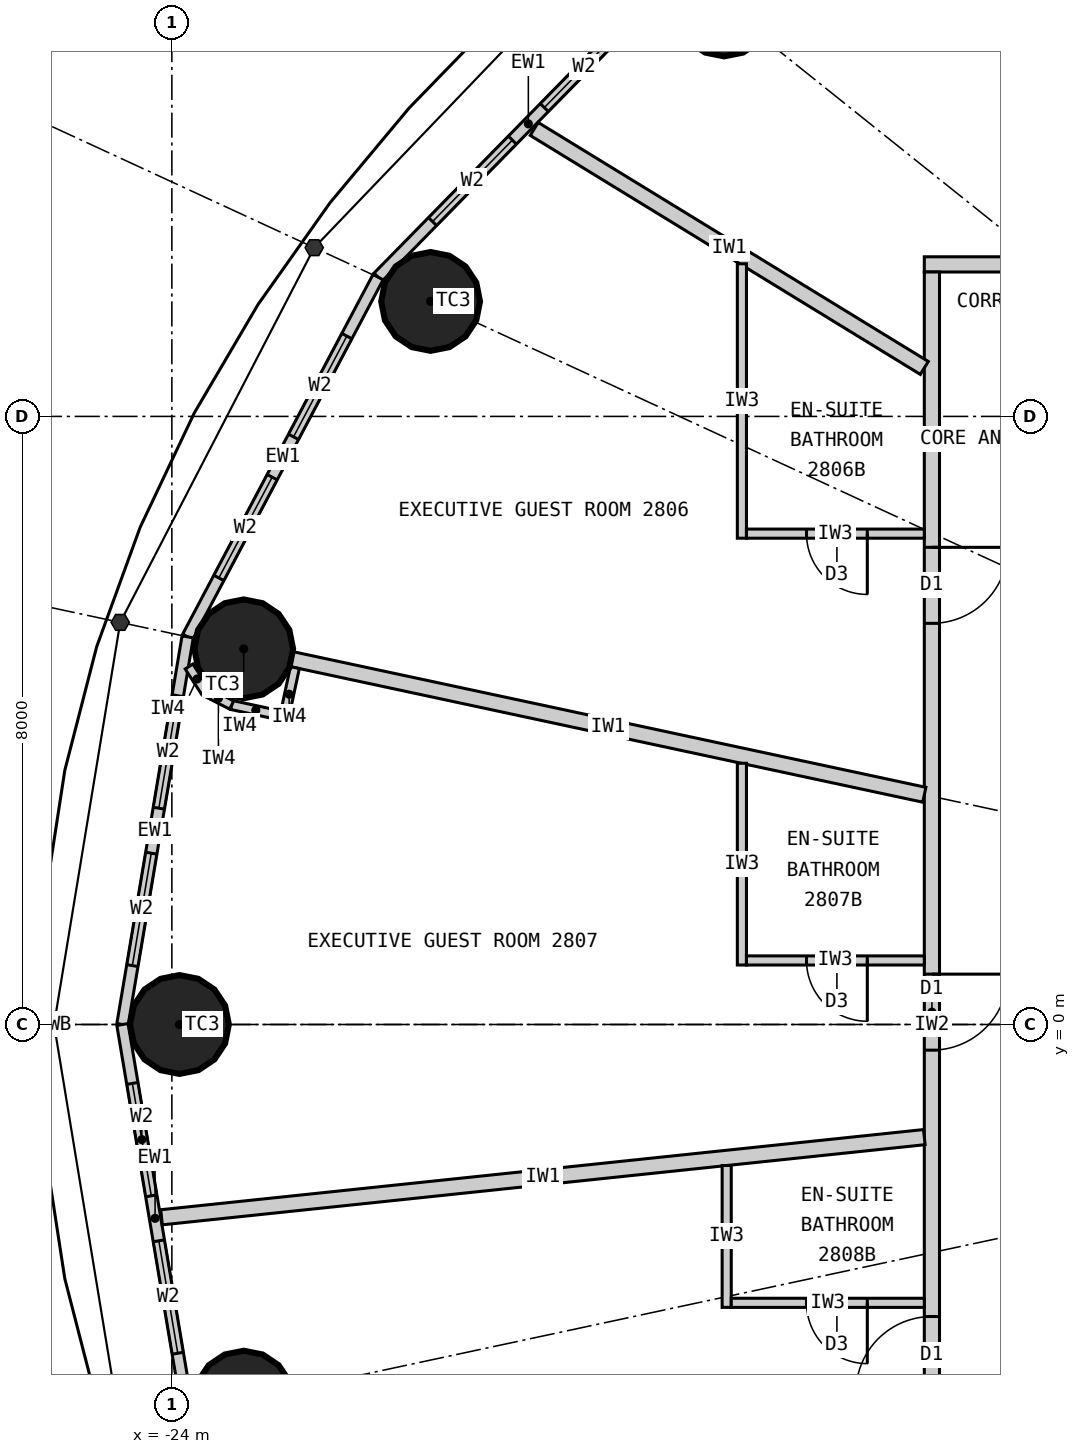
"""IFC4 building model, lengths in metres.
Left out: names, types, materials, properties, quantities, classifications, styles, units other than length and angle.
Written with IfcOpenShell. Run it as: python <this file> out.ifc"""

import sys

from ifc_helpers import new_model, si_unit, direction, frame, frame_2d, origin, origin_2d, place, context, subcontext, project, spatial, rectangle, circle, extrude, element, fill, save


model = new_model("IFC4")
c1 = context("Model", 3, precision=1e-05, world=origin(), true_north=direction((0.0, 1.0)))
c2 = subcontext(c1, "Body", "Model", "MODEL_VIEW")
j1 = project(units=[si_unit("LENGTHUNIT", "METRE"), si_unit("PLANEANGLEUNIT", "RADIAN")], contexts=[c1])
p1 = place(None, origin())
s1 = spatial("IfcSite", under=j1, at=p1, CompositionType="ELEMENT")
p2 = place(p1, origin())
s2 = spatial("IfcBuilding", under=s1, at=p2, CompositionType="ELEMENT")
p3 = place(p2, frame((0.0, 0.0, 112.2)))
s3 = spatial("IfcBuildingStorey", under=s2, at=p3, CompositionType="ELEMENT", Elevation=112.2)
for number, where, z_axis, x_axis in (
    (1, (-16.734, 13.387, 0.0), (0.0, 0.0, 1.0), (1.0, 0.0, 0.0)),
    (2, (-20.596, 9.513, 0.0), (0.0, 0.0, 1.0), (1.0, 0.0, 0.0)),
    (3, (-23.055, 4.942, 0.0), (0.0, 0.0, 1.0), (1.0, 0.0, 0.0)),
    (4, (-23.9, 0.0, 0.0), (0.0, 0.0, 1.0), (1.0, 0.0, 0.0)),
    (5, (-23.055, -4.942, 0.0), (0.0, 0.0, 1.0), (1.0, 0.0, 0.0)),
):
    element("IfcColumn", number, at=place(p3, frame(where, z_axis=z_axis, x_axis=x_axis)), inside=s3, PredefinedType="COLUMN", context=c2, shape_type="SweptSolid", body=[
        extrude(circle(Radius=0.65, at=origin_2d()), origin(), (0.0, 0.0, 1.0), 3.3),
    ])
p4 = place(p3, frame((-17.332, 13.866, 0.0), z_axis=(0.0, 0.0, 1.0), x_axis=(-0.700136650834, -0.714008872605, 0.0)))
e6 = element("IfcWall", 6, at=p4, inside=s3, PredefinedType="ELEMENTEDWALL", context=c2, shape_type="SweptSolid", body=[
    extrude(rectangle(XDim=5.649, YDim=0.15, at=frame_2d((2.825, 0.0))), origin(), (0.0, 0.0, 1.0), 3.12),
])
p5 = place(p4, frame((1.025, 0.0, 0.9)))
e7 = element("IfcOpeningElement", 7, at=p5, cuts=e6, PredefinedType="OPENING", context=c2, shape_type="SweptSolid", body=[
    extrude(rectangle(XDim=1.5, YDim=1.9, at=frame_2d((0.75, 0.95))), frame((0.0, 0.085, 0.0), z_axis=(0.0, -1.0, 0.0), x_axis=(1.0, 0.0, 0.0)), (0.0, 0.0, 1.0), 0.17),
])
p6 = place(p4, frame((3.125, 0.0, 0.9)))
e8 = element("IfcOpeningElement", 8, at=p6, cuts=e6, PredefinedType="OPENING", context=c2, shape_type="SweptSolid", body=[
    extrude(rectangle(XDim=1.5, YDim=1.9, at=frame_2d((0.75, 0.95))), frame((0.0, 0.085, 0.0), z_axis=(0.0, -1.0, 0.0), x_axis=(1.0, 0.0, 0.0)), (0.0, 0.0, 1.0), 0.17),
])
p7 = place(p3, frame((-21.287, 9.832, 0.0), z_axis=(0.0, 0.0, 1.0), x_axis=(-0.467814388454, -0.883826735257, 0.0)))
e9 = element("IfcWall", 9, at=p7, inside=s3, PredefinedType="ELEMENTEDWALL", context=c2, shape_type="SweptSolid", body=[
    extrude(rectangle(XDim=5.354, YDim=0.15, at=frame_2d((2.677, 0.0))), origin(), (0.0, 0.0, 1.0), 3.12),
])
p8 = place(p7, frame((0.877, 0.0, 0.9)))
e10 = element("IfcOpeningElement", 10, at=p8, cuts=e9, PredefinedType="OPENING", context=c2, shape_type="SweptSolid", body=[
    extrude(rectangle(XDim=1.5, YDim=1.9, at=frame_2d((0.75, 0.95))), frame((0.0, 0.085, 0.0), z_axis=(0.0, -1.0, 0.0), x_axis=(1.0, 0.0, 0.0)), (0.0, 0.0, 1.0), 0.17),
])
p9 = place(p7, frame((2.977, 0.0, 0.9)))
e11 = element("IfcOpeningElement", 11, at=p9, cuts=e9, PredefinedType="OPENING", context=c2, shape_type="SweptSolid", body=[
    extrude(rectangle(XDim=1.5, YDim=1.9, at=frame_2d((0.75, 0.95))), frame((0.0, 0.085, 0.0), z_axis=(0.0, -1.0, 0.0), x_axis=(1.0, 0.0, 0.0)), (0.0, 0.0, 1.0), 0.17),
])
p10 = place(p3, frame((-23.792, 5.1, 0.0), z_axis=(0.0, 0.0, 1.0), x_axis=(-0.165883894218, -0.986145290329, 0.0)))
e12 = element("IfcWall", 12, at=p10, inside=s3, PredefinedType="ELEMENTEDWALL", context=c2, shape_type="SweptSolid", body=[
    extrude(rectangle(XDim=5.172, YDim=0.15, at=frame_2d((2.586, 0.0))), origin(), (0.0, 0.0, 1.0), 3.12),
])
p11 = place(p10, frame((0.786, 0.0, 0.9)))
e13 = element("IfcOpeningElement", 13, at=p11, cuts=e12, PredefinedType="OPENING", context=c2, shape_type="SweptSolid", body=[
    extrude(rectangle(XDim=1.5, YDim=1.9, at=frame_2d((0.75, 0.95))), frame((0.0, 0.085, 0.0), z_axis=(0.0, -1.0, 0.0), x_axis=(1.0, 0.0, 0.0)), (0.0, 0.0, 1.0), 0.17),
])
p12 = place(p10, frame((2.886, 0.0, 0.9)))
e14 = element("IfcOpeningElement", 14, at=p12, cuts=e12, PredefinedType="OPENING", context=c2, shape_type="SweptSolid", body=[
    extrude(rectangle(XDim=1.5, YDim=1.9, at=frame_2d((0.75, 0.95))), frame((0.0, 0.085, 0.0), z_axis=(0.0, -1.0, 0.0), x_axis=(1.0, 0.0, 0.0)), (0.0, 0.0, 1.0), 0.17),
])
p13 = place(p3, frame((-24.65, 0.0, 0.0), z_axis=(0.0, 0.0, 1.0), x_axis=(0.165883894218, -0.986145290329, 0.0)))
e15 = element("IfcWall", 15, at=p13, inside=s3, PredefinedType="ELEMENTEDWALL", context=c2, shape_type="SweptSolid", body=[
    extrude(rectangle(XDim=5.172, YDim=0.15, at=frame_2d((2.586, 0.0))), origin(), (0.0, 0.0, 1.0), 3.12),
])
p14 = place(p13, frame((0.786, 0.0, 0.9)))
e16 = element("IfcOpeningElement", 16, at=p14, cuts=e15, PredefinedType="OPENING", context=c2, shape_type="SweptSolid", body=[
    extrude(rectangle(XDim=1.5, YDim=1.9, at=frame_2d((0.75, 0.95))), frame((0.0, 0.085, 0.0), z_axis=(0.0, -1.0, 0.0), x_axis=(1.0, 0.0, 0.0)), (0.0, 0.0, 1.0), 0.17),
])
p15 = place(p13, frame((2.886, 0.0, 0.9)))
e17 = element("IfcOpeningElement", 17, at=p15, cuts=e15, PredefinedType="OPENING", context=c2, shape_type="SweptSolid", body=[
    extrude(rectangle(XDim=1.5, YDim=1.9, at=frame_2d((0.75, 0.95))), frame((0.0, 0.085, 0.0), z_axis=(0.0, -1.0, 0.0), x_axis=(1.0, 0.0, 0.0)), (0.0, 0.0, 1.0), 0.17),
])
p16 = place(p3, frame((-14.1, 10.0, 0.0), z_axis=(0.0, 0.0, 1.0), x_axis=(1.0, 0.0, 0.0)))
e18 = element("IfcWall", 18, at=p16, inside=s3, PredefinedType="PARTITIONING", context=c2, shape_type="SweptSolid", body=[
    extrude(rectangle(XDim=12.535, YDim=0.2, at=frame_2d((6.268, 0.0))), origin(), (0.0, 0.0, 1.0), 3.12),
])
p17 = place(p16, frame((2.801, 0.0, 0.0)))
e19 = element("IfcOpeningElement", 19, at=p17, cuts=e18, PredefinedType="OPENING", context=c2, shape_type="SweptSolid", body=[
    extrude(rectangle(XDim=1.0, YDim=2.2, at=frame_2d((0.5, 1.1))), frame((0.0, 0.11, 0.0), z_axis=(0.0, -1.0, 0.0), x_axis=(1.0, 0.0, 0.0)), (0.0, 0.0, 1.0), 0.22),
])
p18 = place(p3, frame((-14.0, 9.9, 0.0), z_axis=(0.0, 0.0, 1.0), x_axis=(0.0, -1.0, 0.0)))
e20 = element("IfcWall", 20, at=p18, inside=s3, PredefinedType="PARTITIONING", context=c2, shape_type="SweptSolid", body=[
    extrude(rectangle(XDim=19.8, YDim=0.2, at=frame_2d((9.9, 0.0))), origin(), (0.0, 0.0, 1.0), 3.12),
])
p19 = place(p18, frame((3.622, 0.0, 0.0)))
e21 = element("IfcOpeningElement", 21, at=p19, cuts=e20, PredefinedType="OPENING", context=c2, shape_type="SweptSolid", body=[
    extrude(rectangle(XDim=1.0, YDim=2.2, at=frame_2d((0.5, 1.1))), frame((0.0, 0.11, 0.0), z_axis=(0.0, -1.0, 0.0), x_axis=(1.0, 0.0, 0.0)), (0.0, 0.0, 1.0), 0.22),
])
p20 = place(p18, frame((9.238, 0.0, 0.0)))
e22 = element("IfcOpeningElement", 22, at=p20, cuts=e20, PredefinedType="OPENING", context=c2, shape_type="SweptSolid", body=[
    extrude(rectangle(XDim=1.0, YDim=2.2, at=frame_2d((0.5, 1.1))), frame((0.0, 0.11, 0.0), z_axis=(0.0, -1.0, 0.0), x_axis=(1.0, 0.0, 0.0)), (0.0, 0.0, 1.0), 0.22),
])
p21 = place(p18, frame((13.742, 0.0, 0.0)))
e23 = element("IfcOpeningElement", 23, at=p21, cuts=e20, PredefinedType="OPENING", context=c2, shape_type="SweptSolid", body=[
    extrude(rectangle(XDim=1.0, YDim=2.2, at=frame_2d((0.5, 1.1))), frame((0.0, 0.11, 0.0), z_axis=(0.0, -1.0, 0.0), x_axis=(1.0, 0.0, 0.0)), (0.0, 0.0, 1.0), 0.22),
])
p22 = place(p18, frame((18.698, 0.0, 0.0)))
e24 = element("IfcOpeningElement", 24, at=p22, cuts=e20, PredefinedType="OPENING", context=c2, shape_type="SweptSolid", body=[
    extrude(rectangle(XDim=1.0, YDim=2.2, at=frame_2d((0.5, 1.1))), frame((0.0, 0.11, 0.0), z_axis=(0.0, -1.0, 0.0), x_axis=(1.0, 0.0, 0.0)), (0.0, 0.0, 1.0), 0.22),
])
p23 = place(p3, frame((-14.1, 8.638, 0.0), z_axis=(0.0, 0.0, 1.0), x_axis=(-0.852706758009, 0.5223898782, 0.0)))
e25 = element("IfcWall", 25, at=p23, inside=s3, PredefinedType="PARTITIONING", context=c2, shape_type="SweptSolid", body=[
    extrude(rectangle(XDim=6.019, YDim=0.2, at=frame_2d((3.009, 0.0))), origin(), (0.0, 0.0, 1.0), 3.12),
])
p24 = place(p3, frame((-14.1, 3.022, 0.0), z_axis=(0.0, 0.0, 1.0), x_axis=(-0.977783513367, 0.209617272638, 0.0)))
e26 = element("IfcWall", 26, at=p24, inside=s3, PredefinedType="PARTITIONING", context=c2, shape_type="SweptSolid", body=[
    extrude(rectangle(XDim=8.508, YDim=0.2, at=frame_2d((4.254, 0.0))), origin(), (0.0, 0.0, 1.0), 2.37),
])
p25 = place(p3, frame((-14.1, -1.482, 0.0), z_axis=(0.0, 0.0, 1.0), x_axis=(-0.994523202615, -0.104516024894, 0.0)))
e27 = element("IfcWall", 27, at=p25, inside=s3, PredefinedType="PARTITIONING", context=c2, shape_type="SweptSolid", body=[
    extrude(rectangle(XDim=10.091, YDim=0.2, at=frame_2d((5.045, 0.0))), origin(), (0.0, 0.0, 1.0), 2.47),
])
p26 = place(p3, frame((-16.5, 10.008, 0.0), z_axis=(0.0, 0.0, 1.0), x_axis=(0.0, -1.0, 0.0)))
e28 = element("IfcWall", 28, at=p26, inside=s3, PredefinedType="PARTITIONING", context=c2, shape_type="SweptSolid", body=[
    extrude(rectangle(XDim=3.61, YDim=0.12, at=frame_2d((1.805, 0.0))), origin(), (0.0, 0.0, 1.0), 3.12),
])
p27 = place(p3, frame((-14.1, 6.458, 0.0), z_axis=(0.0, 0.0, 1.0), x_axis=(-1.0, 0.0, 0.0)))
e29 = element("IfcWall", 29, at=p27, inside=s3, PredefinedType="PARTITIONING", context=c2, shape_type="SweptSolid", body=[
    extrude(rectangle(XDim=2.34, YDim=0.12, at=frame_2d((1.17, 0.0))), origin(), (0.0, 0.0, 1.0), 3.12),
])
p28 = place(p27, frame((0.75, 0.0, 0.0)))
e30 = element("IfcOpeningElement", 30, at=p28, cuts=e29, PredefinedType="OPENING", context=c2, shape_type="SweptSolid", body=[
    extrude(rectangle(XDim=0.8, YDim=2.1, at=frame_2d((0.4, 1.05))), frame((0.0, 0.07, 0.0), z_axis=(0.0, -1.0, 0.0), x_axis=(1.0, 0.0, 0.0)), (0.0, 0.0, 1.0), 0.14),
])
p29 = place(p3, frame((-16.5, 3.437, 0.0), z_axis=(0.0, 0.0, 1.0), x_axis=(0.0, -1.0, 0.0)))
e31 = element("IfcWall", 31, at=p29, inside=s3, PredefinedType="PARTITIONING", context=c2, shape_type="SweptSolid", body=[
    extrude(rectangle(XDim=2.655, YDim=0.12, at=frame_2d((1.327, 0.0))), origin(), (0.0, 0.0, 1.0), 3.12),
])
p30 = place(p3, frame((-14.1, 0.843, 0.0), z_axis=(0.0, 0.0, 1.0), x_axis=(-1.0, 0.0, 0.0)))
e32 = element("IfcWall", 32, at=p30, inside=s3, PredefinedType="PARTITIONING", context=c2, shape_type="SweptSolid", body=[
    extrude(rectangle(XDim=2.34, YDim=0.12, at=frame_2d((1.17, 0.0))), origin(), (0.0, 0.0, 1.0), 3.12),
])
p31 = place(p30, frame((0.75, 0.0, 0.0)))
e33 = element("IfcOpeningElement", 33, at=p31, cuts=e32, PredefinedType="OPENING", context=c2, shape_type="SweptSolid", body=[
    extrude(rectangle(XDim=0.8, YDim=2.1, at=frame_2d((0.4, 1.05))), frame((0.0, 0.07, 0.0), z_axis=(0.0, -1.0, 0.0), x_axis=(1.0, 0.0, 0.0)), (0.0, 0.0, 1.0), 0.14),
])
p32 = place(p3, frame((-16.7, -1.855, 0.0), z_axis=(0.0, 0.0, 1.0), x_axis=(0.0, -1.0, 0.0)))
e34 = element("IfcWall", 34, at=p32, inside=s3, PredefinedType="PARTITIONING", context=c2, shape_type="SweptSolid", body=[
    extrude(rectangle(XDim=1.867, YDim=0.12, at=frame_2d((0.933, 0.0))), origin(), (0.0, 0.0, 1.0), 3.12),
])
p33 = place(p3, frame((-14.1, -3.662, 0.0), z_axis=(0.0, 0.0, 1.0), x_axis=(-1.0, 0.0, 0.0)))
e35 = element("IfcWall", 35, at=p33, inside=s3, PredefinedType="PARTITIONING", context=c2, shape_type="SweptSolid", body=[
    extrude(rectangle(XDim=2.54, YDim=0.12, at=frame_2d((1.27, 0.0))), origin(), (0.0, 0.0, 1.0), 2.37),
])
p34 = place(p33, frame((0.75, 0.0, 0.0)))
e36 = element("IfcOpeningElement", 36, at=p34, cuts=e35, PredefinedType="OPENING", context=c2, shape_type="SweptSolid", body=[
    extrude(rectangle(XDim=0.8, YDim=2.1, at=frame_2d((0.4, 1.05))), frame((0.0, 0.07, 0.0), z_axis=(0.0, -1.0, 0.0), x_axis=(1.0, 0.0, 0.0)), (0.0, 0.0, 1.0), 0.14),
])
p35 = place(p3, frame((-22.382, 4.695, 0.0), z_axis=(0.0, 0.0, 1.0), x_axis=(-0.209808658628, -0.977742464438, 0.0)))
e37 = element("IfcWall", 37, at=p35, inside=s3, PredefinedType="PARTITIONING", context=c2, shape_type="SweptSolid", body=[
    extrude(rectangle(XDim=0.716, YDim=0.12, at=frame_2d((0.358, 0.0))), origin(), (0.0, 0.0, 1.0), 3.12),
])
p36 = place(p3, frame((-22.578, 4.067, 0.0), z_axis=(0.0, 0.0, 1.0), x_axis=(-0.977802414077, 0.209529088731, 0.0)))
e38 = element("IfcWall", 38, at=p36, inside=s3, PredefinedType="PARTITIONING", context=c2, shape_type="SweptSolid", body=[
    extrude(rectangle(XDim=0.65, YDim=0.12, at=frame_2d((0.325, 0.0))), origin(), (0.0, 0.0, 1.0), 3.12),
])
for number, where, z_axis, x_axis in (
    (39, (-23.213, 4.203, 0.0), (0.0, 0.0, 1.0), (-0.89, 0.456, 0.0)),
    (40, (-23.562, 4.381, 0.0), (0.0, 0.0, 1.0), (-0.543, 0.84, 0.0)),
):
    element("IfcWall", number, at=place(p3, frame(where, z_axis=z_axis, x_axis=x_axis)), inside=s3, PredefinedType="PARTITIONING", context=c2, shape_type="SweptSolid", body=[
        extrude(rectangle(XDim=0.391, YDim=0.12, at=frame_2d((0.196, 0.0))), origin(), (0.0, 0.0, 1.0), 3.12),
    ])
p37 = place(p5, origin())
e41 = element("IfcWindow", 41, at=p37, inside=s3, PartitioningType="SINGLE_PANEL", PredefinedType="WINDOW", context=c2, shape_type="SweptSolid", body=[
    extrude(rectangle(XDim=1.5, YDim=1.9, at=frame_2d((0.75, 0.95))), frame((0.0, 0.03, 0.0), z_axis=(0.0, -1.0, 0.0), x_axis=(1.0, 0.0, 0.0)), (0.0, 0.0, 1.0), 0.06),
])
fill(e7, e41)
p38 = place(p6, origin())
e42 = element("IfcWindow", 42, at=p38, inside=s3, PartitioningType="SINGLE_PANEL", PredefinedType="WINDOW", context=c2, shape_type="SweptSolid", body=[
    extrude(rectangle(XDim=1.5, YDim=1.9, at=frame_2d((0.75, 0.95))), frame((0.0, 0.03, 0.0), z_axis=(0.0, -1.0, 0.0), x_axis=(1.0, 0.0, 0.0)), (0.0, 0.0, 1.0), 0.06),
])
fill(e8, e42)
p39 = place(p8, origin())
e43 = element("IfcWindow", 43, at=p39, inside=s3, PartitioningType="SINGLE_PANEL", PredefinedType="WINDOW", context=c2, shape_type="SweptSolid", body=[
    extrude(rectangle(XDim=1.5, YDim=1.9, at=frame_2d((0.75, 0.95))), frame((0.0, 0.03, 0.0), z_axis=(0.0, -1.0, 0.0), x_axis=(1.0, 0.0, 0.0)), (0.0, 0.0, 1.0), 0.06),
])
fill(e10, e43)
p40 = place(p9, origin())
e44 = element("IfcWindow", 44, at=p40, inside=s3, PartitioningType="SINGLE_PANEL", PredefinedType="WINDOW", context=c2, shape_type="SweptSolid", body=[
    extrude(rectangle(XDim=1.5, YDim=1.9, at=frame_2d((0.75, 0.95))), frame((0.0, 0.03, 0.0), z_axis=(0.0, -1.0, 0.0), x_axis=(1.0, 0.0, 0.0)), (0.0, 0.0, 1.0), 0.06),
])
fill(e11, e44)
p41 = place(p11, origin())
e45 = element("IfcWindow", 45, at=p41, inside=s3, PartitioningType="SINGLE_PANEL", PredefinedType="WINDOW", context=c2, shape_type="SweptSolid", body=[
    extrude(rectangle(XDim=1.5, YDim=1.9, at=frame_2d((0.75, 0.95))), frame((0.0, 0.03, 0.0), z_axis=(0.0, -1.0, 0.0), x_axis=(1.0, 0.0, 0.0)), (0.0, 0.0, 1.0), 0.06),
])
fill(e13, e45)
p42 = place(p12, origin())
e46 = element("IfcWindow", 46, at=p42, inside=s3, PartitioningType="SINGLE_PANEL", PredefinedType="WINDOW", context=c2, shape_type="SweptSolid", body=[
    extrude(rectangle(XDim=1.5, YDim=1.9, at=frame_2d((0.75, 0.95))), frame((0.0, 0.03, 0.0), z_axis=(0.0, -1.0, 0.0), x_axis=(1.0, 0.0, 0.0)), (0.0, 0.0, 1.0), 0.06),
])
fill(e14, e46)
p43 = place(p14, origin())
e47 = element("IfcWindow", 47, at=p43, inside=s3, PartitioningType="SINGLE_PANEL", PredefinedType="WINDOW", context=c2, shape_type="SweptSolid", body=[
    extrude(rectangle(XDim=1.5, YDim=1.9, at=frame_2d((0.75, 0.95))), frame((0.0, 0.03, 0.0), z_axis=(0.0, -1.0, 0.0), x_axis=(1.0, 0.0, 0.0)), (0.0, 0.0, 1.0), 0.06),
])
fill(e16, e47)
p44 = place(p15, origin())
e48 = element("IfcWindow", 48, at=p44, inside=s3, PartitioningType="SINGLE_PANEL", PredefinedType="WINDOW", context=c2, shape_type="SweptSolid", body=[
    extrude(rectangle(XDim=1.5, YDim=1.9, at=frame_2d((0.75, 0.95))), frame((0.0, 0.03, 0.0), z_axis=(0.0, -1.0, 0.0), x_axis=(1.0, 0.0, 0.0)), (0.0, 0.0, 1.0), 0.06),
])
fill(e17, e48)
p45 = place(p28, origin())
e49 = element("IfcDoor", 49, at=p45, inside=s3, OperationType="SINGLE_SWING_LEFT", PredefinedType="DOOR", context=c2, shape_type="SweptSolid", body=[
    extrude(rectangle(XDim=0.8, YDim=2.1, at=frame_2d((0.4, 1.05))), frame((0.0, 0.025, 0.0), z_axis=(0.0, -1.0, 0.0), x_axis=(1.0, 0.0, 0.0)), (0.0, 0.0, 1.0), 0.05),
])
fill(e30, e49)
p46 = place(p19, origin())
e50 = element("IfcDoor", 50, at=p46, inside=s3, OperationType="SINGLE_SWING_LEFT", PredefinedType="DOOR", context=c2, shape_type="SweptSolid", body=[
    extrude(rectangle(XDim=1.0, YDim=2.2, at=frame_2d((0.5, 1.1))), frame((0.0, 0.025, 0.0), z_axis=(0.0, -1.0, 0.0), x_axis=(1.0, 0.0, 0.0)), (0.0, 0.0, 1.0), 0.05),
])
fill(e21, e50)
p47 = place(p31, origin())
e51 = element("IfcDoor", 51, at=p47, inside=s3, OperationType="SINGLE_SWING_LEFT", PredefinedType="DOOR", context=c2, shape_type="SweptSolid", body=[
    extrude(rectangle(XDim=0.8, YDim=2.1, at=frame_2d((0.4, 1.05))), frame((0.0, 0.025, 0.0), z_axis=(0.0, -1.0, 0.0), x_axis=(1.0, 0.0, 0.0)), (0.0, 0.0, 1.0), 0.05),
])
fill(e33, e51)
p48 = place(p20, origin())
e52 = element("IfcDoor", 52, at=p48, inside=s3, OperationType="SINGLE_SWING_LEFT", PredefinedType="DOOR", context=c2, shape_type="SweptSolid", body=[
    extrude(rectangle(XDim=1.0, YDim=2.2, at=frame_2d((0.5, 1.1))), frame((0.0, 0.025, 0.0), z_axis=(0.0, -1.0, 0.0), x_axis=(1.0, 0.0, 0.0)), (0.0, 0.0, 1.0), 0.05),
])
fill(e22, e52)
p49 = place(p34, origin())
e53 = element("IfcDoor", 53, at=p49, inside=s3, OperationType="SINGLE_SWING_LEFT", PredefinedType="DOOR", context=c2, shape_type="SweptSolid", body=[
    extrude(rectangle(XDim=0.8, YDim=2.1, at=frame_2d((0.4, 1.05))), frame((0.0, 0.025, 0.0), z_axis=(0.0, -1.0, 0.0), x_axis=(1.0, 0.0, 0.0)), (0.0, 0.0, 1.0), 0.05),
])
fill(e36, e53)
p50 = place(p21, origin())
e54 = element("IfcDoor", 54, at=p50, inside=s3, OperationType="SINGLE_SWING_RIGHT", PredefinedType="DOOR", context=c2, shape_type="SweptSolid", body=[
    extrude(rectangle(XDim=1.0, YDim=2.2, at=frame_2d((0.5, 1.1))), frame((0.0, 0.025, 0.0), z_axis=(0.0, -1.0, 0.0), x_axis=(1.0, 0.0, 0.0)), (0.0, 0.0, 1.0), 0.05),
])
fill(e23, e54)
save(model, sys.argv[1])
